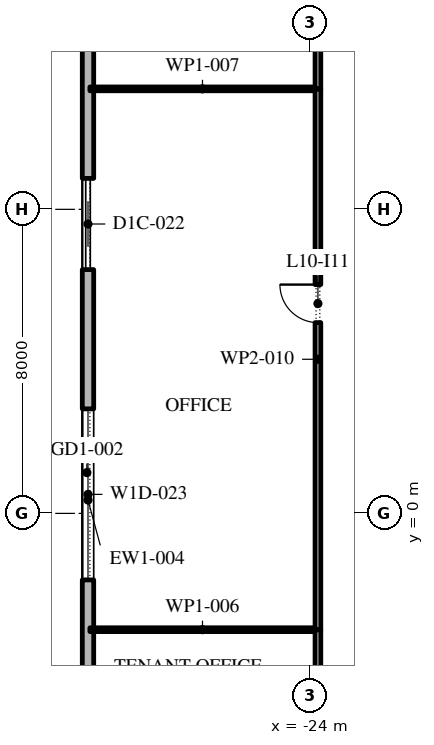
"""IFC4 building model, lengths in metres.
Left out: names, types, materials, properties, quantities, classifications, styles, units other than length and angle.
Written with IfcOpenShell. Run it as: python <this file> out.ifc"""

import sys

from ifc_helpers import new_model, si_unit, direction, frame, frame_2d, origin, place, context, subcontext, project, spatial, rectangle, extrude, element, fill, save


model = new_model("IFC4")
c1 = context("Model", 3, precision=1e-05, world=origin(), true_north=direction((0.0, 1.0)))
c2 = subcontext(c1, "Body", "Model", "MODEL_VIEW")
j1 = project(units=[si_unit("LENGTHUNIT", "METRE"), si_unit("PLANEANGLEUNIT", "RADIAN")], contexts=[c1])
p1 = place(None, origin())
s1 = spatial("IfcSite", under=j1, at=p1, CompositionType="ELEMENT")
p2 = place(p1, origin())
s2 = spatial("IfcBuilding", under=s1, at=p2, CompositionType="ELEMENT")
p3 = place(p2, frame((0.0, 0.0, 52.2)))
s3 = spatial("IfcBuildingStorey", under=s2, at=p3, CompositionType="ELEMENT", Elevation=52.2)
p4 = place(p3, frame((-29.85, 25.1, 0.0), z_axis=(0.0, 0.0, 1.0), x_axis=(0.0, -1.0, 0.0)))
e1 = element("IfcWall", 1, at=p4, inside=s3, PredefinedType="STANDARD", context=c2, shape_type="SweptSolid", body=[
    extrude(rectangle(XDim=49.5, YDim=0.3, at=frame_2d((24.75, 0.0))), origin(), (0.0, 0.0, 1.0), 4.0),
])
p5 = place(p4, frame((1.157, 0.0, 0.45)))
e2 = element("IfcOpeningElement", 2, at=p5, cuts=e1, PredefinedType="OPENING", context=c2, shape_type="SweptSolid", body=[
    extrude(rectangle(XDim=4.5, YDim=2.875, at=frame_2d((2.25, 1.438))), frame((0.0, 0.16, 0.0), z_axis=(0.0, -1.0, 0.0), x_axis=(1.0, 0.0, 0.0)), (0.0, 0.0, 1.0), 0.32),
])
p6 = place(p4, frame((8.121, 0.0, 0.45)))
e3 = element("IfcOpeningElement", 3, at=p6, cuts=e1, PredefinedType="OPENING", context=c2, shape_type="SweptSolid", body=[
    extrude(rectangle(XDim=4.5, YDim=3.05, at=frame_2d((2.25, 1.525))), frame((0.0, 0.16, 0.0), z_axis=(0.0, -1.0, 0.0), x_axis=(1.0, 0.0, 0.0)), (0.0, 0.0, 1.0), 0.32),
])
p7 = place(p4, frame((16.286, 0.0, 0.0)))
e4 = element("IfcOpeningElement", 4, at=p7, cuts=e1, PredefinedType="OPENING", context=c2, shape_type="SweptSolid", body=[
    extrude(rectangle(XDim=2.4, YDim=3.325, at=frame_2d((1.2, 1.663))), frame((0.0, 0.16, 0.0), z_axis=(0.0, -1.0, 0.0), x_axis=(1.0, 0.0, 0.0)), (0.0, 0.0, 1.0), 0.32),
])
p8 = place(p4, frame((22.35, 0.0, 0.45)))
e5 = element("IfcOpeningElement", 5, at=p8, cuts=e1, PredefinedType="OPENING", context=c2, shape_type="SweptSolid", body=[
    extrude(rectangle(XDim=4.5, YDim=2.875, at=frame_2d((2.25, 1.438))), frame((0.0, 0.16, 0.0), z_axis=(0.0, -1.0, 0.0), x_axis=(1.0, 0.0, 0.0)), (0.0, 0.0, 1.0), 0.32),
])
p9 = place(p4, frame((29.464, 0.0, 0.45)))
e6 = element("IfcOpeningElement", 6, at=p9, cuts=e1, PredefinedType="OPENING", context=c2, shape_type="SweptSolid", body=[
    extrude(rectangle(XDim=4.5, YDim=2.875, at=frame_2d((2.25, 1.438))), frame((0.0, 0.16, 0.0), z_axis=(0.0, -1.0, 0.0), x_axis=(1.0, 0.0, 0.0)), (0.0, 0.0, 1.0), 0.32),
])
p10 = place(p4, frame((36.579, 0.0, 0.45)))
e7 = element("IfcOpeningElement", 7, at=p10, cuts=e1, PredefinedType="OPENING", context=c2, shape_type="SweptSolid", body=[
    extrude(rectangle(XDim=4.5, YDim=2.825, at=frame_2d((2.25, 1.413))), frame((0.0, 0.16, 0.0), z_axis=(0.0, -1.0, 0.0), x_axis=(1.0, 0.0, 0.0)), (0.0, 0.0, 1.0), 0.32),
])
p11 = place(p4, frame((44.743, 0.0, 0.0)))
e8 = element("IfcOpeningElement", 8, at=p11, cuts=e1, PredefinedType="OPENING", context=c2, shape_type="SweptSolid", body=[
    extrude(rectangle(XDim=2.4, YDim=3.5, at=frame_2d((1.2, 1.75))), frame((0.0, 0.16, 0.0), z_axis=(0.0, -1.0, 0.0), x_axis=(1.0, 0.0, 0.0)), (0.0, 0.0, 1.0), 0.32),
])
p12 = place(p3, frame((-23.8, -10.12, 0.0), z_axis=(0.0, 0.0, 1.0), x_axis=(0.0, 1.0, 0.0)))
e9 = element("IfcWall", 9, at=p12, inside=s3, PredefinedType="PARTITIONING", context=c2, shape_type="SweptSolid", body=[
    extrude(rectangle(XDim=7.06, YDim=0.15, at=frame_2d((3.53, 0.0))), origin(), (0.0, 0.0, 1.0), 4.0),
])
p13 = place(p12, frame((1.66, 0.0, 0.0)))
e10 = element("IfcOpeningElement", 10, at=p13, cuts=e9, PredefinedType="OPENING", context=c2, shape_type="SweptSolid", body=[
    extrude(rectangle(XDim=1.0, YDim=2.1, at=frame_2d((0.5, 1.05))), frame((0.0, 0.085, 0.0), z_axis=(0.0, -1.0, 0.0), x_axis=(1.0, 0.0, 0.0)), (0.0, 0.0, 1.0), 0.17),
])
p14 = place(p3, frame((-23.875, -3.06, 0.0), z_axis=(0.0, 0.0, 1.0), x_axis=(-1.0, 0.0, 0.0)))
e11 = element("IfcWall", 11, at=p14, inside=s3, PredefinedType="PARTITIONING", context=c2, shape_type="SweptSolid", body=[
    extrude(rectangle(XDim=5.925, YDim=0.1, at=frame_2d((2.962, 0.0))), origin(), (0.0, 0.0, 1.0), 4.0),
])
p15 = place(p3, frame((-23.8, -3.06, 0.0), z_axis=(0.0, 0.0, 1.0), x_axis=(0.0, 1.0, 0.0)))
e12 = element("IfcWall", 12, at=p15, inside=s3, PredefinedType="PARTITIONING", context=c2, shape_type="SweptSolid", body=[
    extrude(rectangle(XDim=14.23, YDim=0.15, at=frame_2d((7.115, 0.0))), origin(), (0.0, 0.0, 1.0), 4.0),
])
p16 = place(p15, frame((8.08, 0.0, 0.0)))
e13 = element("IfcOpeningElement", 13, at=p16, cuts=e12, PredefinedType="OPENING", context=c2, shape_type="SweptSolid", body=[
    extrude(rectangle(XDim=1.0, YDim=2.1, at=frame_2d((0.5, 1.05))), frame((0.0, 0.085, 0.0), z_axis=(0.0, -1.0, 0.0), x_axis=(1.0, 0.0, 0.0)), (0.0, 0.0, 1.0), 0.17),
])
p17 = place(p3, frame((-23.875, 11.17, 0.0), z_axis=(0.0, 0.0, 1.0), x_axis=(-1.0, 0.0, 0.0)))
e14 = element("IfcWall", 14, at=p17, inside=s3, PredefinedType="PARTITIONING", context=c2, shape_type="SweptSolid", body=[
    extrude(rectangle(XDim=5.925, YDim=0.1, at=frame_2d((2.962, 0.0))), origin(), (0.0, 0.0, 1.0), 4.0),
])
p18 = place(p3, frame((-23.8, 11.17, 0.0), z_axis=(0.0, 0.0, 1.0), x_axis=(0.0, 1.0, 0.0)))
e15 = element("IfcWall", 15, at=p18, inside=s3, PredefinedType="PARTITIONING", context=c2, shape_type="SweptSolid", body=[
    extrude(rectangle(XDim=16.03, YDim=0.15, at=frame_2d((8.015, 0.0))), origin(), (0.0, 0.0, 1.0), 4.0),
])
p19 = place(p18, frame((10.63, 0.0, 0.0)))
e16 = element("IfcOpeningElement", 16, at=p19, cuts=e15, PredefinedType="OPENING", context=c2, shape_type="SweptSolid", body=[
    extrude(rectangle(XDim=1.0, YDim=2.1, at=frame_2d((0.5, 1.05))), frame((0.0, 0.085, 0.0), z_axis=(0.0, -1.0, 0.0), x_axis=(1.0, 0.0, 0.0)), (0.0, 0.0, 1.0), 0.17),
])
p20 = place(p7, origin())
e17 = element("IfcDoor", 17, at=p20, inside=s3, OperationType="DOUBLE_DOOR_SLIDING", PredefinedType="DOOR", context=c2, shape_type="SweptSolid", body=[
    extrude(rectangle(XDim=2.4, YDim=3.325, at=frame_2d((1.2, 1.663))), frame((0.0, 0.025, 0.0), z_axis=(0.0, -1.0, 0.0), x_axis=(1.0, 0.0, 0.0)), (0.0, 0.0, 1.0), 0.05),
])
fill(e4, e17)
p21 = place(p8, origin())
e18 = element("IfcWindow", 18, at=p21, inside=s3, PartitioningType="DOUBLE_PANEL_VERTICAL", PredefinedType="WINDOW", context=c2, shape_type="SweptSolid", body=[
    extrude(rectangle(XDim=4.5, YDim=2.875, at=frame_2d((2.25, 1.438))), frame((0.0, 0.03, 0.0), z_axis=(0.0, -1.0, 0.0), x_axis=(1.0, 0.0, 0.0)), (0.0, 0.0, 1.0), 0.06),
])
fill(e5, e18)
p22 = place(p16, origin())
e19 = element("IfcDoor", 19, at=p22, inside=s3, OperationType="SINGLE_SWING_LEFT", PredefinedType="DOOR", context=c2, shape_type="SweptSolid", body=[
    extrude(rectangle(XDim=1.0, YDim=2.1, at=frame_2d((0.5, 1.05))), frame((0.0, 0.025, 0.0), z_axis=(0.0, -1.0, 0.0), x_axis=(1.0, 0.0, 0.0)), (0.0, 0.0, 1.0), 0.05),
])
fill(e13, e19)
save(model, sys.argv[1])
